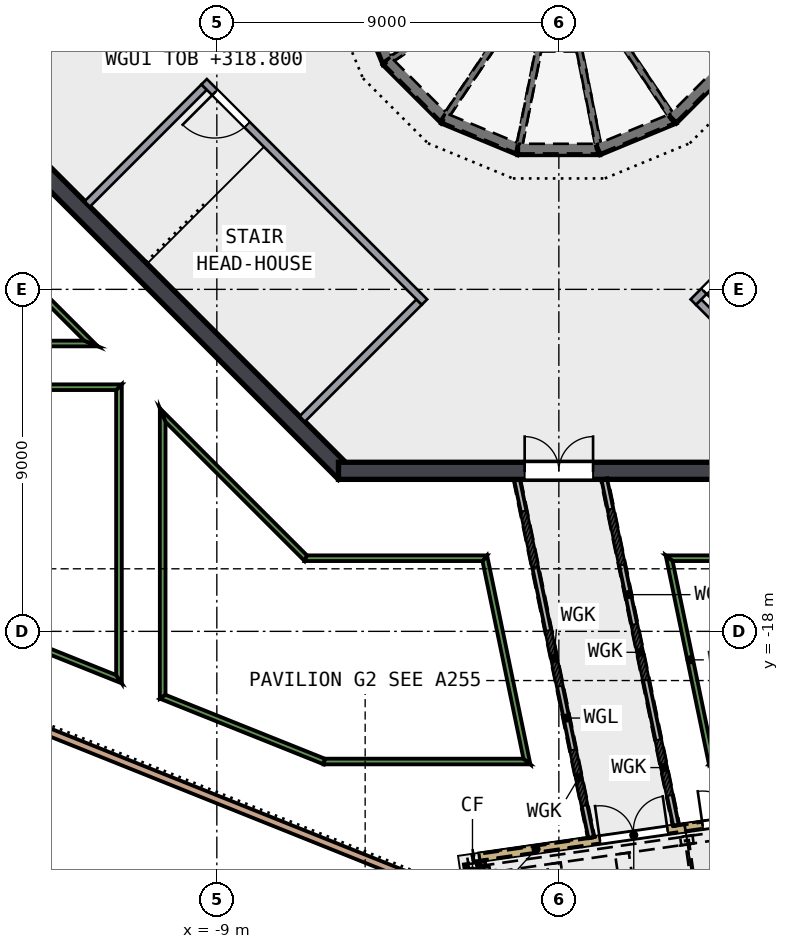
"""IFC4 building model, lengths in metres.
Left out: names, types, materials, properties, quantities, classifications, styles, units other than length and angle.
Written with IfcOpenShell. Run it as: python <this file> out.ifc"""

import sys

from ifc_helpers import new_model, si_unit, direction, frame, frame_2d, origin, origin_2d, place, context, subcontext, project, spatial, polyline, rectangle, i_section, outline, extrude, element, fill, save


model = new_model("IFC4")
c1 = context("Model", 3, precision=1e-05, world=origin(), true_north=direction((0.0, 1.0)))
c2 = subcontext(c1, "Body", "Model", "MODEL_VIEW")
j1 = project(units=[si_unit("LENGTHUNIT", "METRE"), si_unit("PLANEANGLEUNIT", "RADIAN")], contexts=[c1])
p1 = place(None, origin())
s1 = spatial("IfcSite", under=j1, at=p1, CompositionType="ELEMENT")
p2 = place(p1, origin())
s2 = spatial("IfcBuilding", under=s1, at=p2, CompositionType="ELEMENT")
p3 = place(p2, frame((0.0, 0.0, 315.0)))
s3 = spatial("IfcBuildingStorey", under=s2, at=p3, CompositionType="ELEMENT", Elevation=315.0)
p4 = place(p3, frame((-13.841, -5.64, 0.0), z_axis=(0.0, 0.0, 1.0), x_axis=(0.707106781, -0.707106781, 0.0)))
e1 = element("IfcWall", 1, at=p4, inside=s3, PredefinedType="SHEAR", context=c2, shape_type="SweptSolid", body=[
    extrude(rectangle(XDim=11.598, YDim=0.45, at=frame_2d((5.799, 0.0))), origin(), (0.0, 0.0, 1.0), 7.5),
])
p5 = place(p3, frame((-5.799, -13.775, 0.0), z_axis=(0.0, 0.0, 1.0), x_axis=(1.0, 0.0, 0.0)))
e2 = element("IfcWall", 2, at=p5, inside=s3, PredefinedType="SHEAR", context=c2, shape_type="SweptSolid", body=[
    extrude(rectangle(XDim=11.598, YDim=0.45, at=frame_2d((5.799, 0.0))), origin(), (0.0, 0.0, 1.0), 7.5),
])
p6 = place(p5, frame((4.899, 0.0, 0.0)))
e3 = element("IfcOpeningElement", 3, at=p6, cuts=e2, PredefinedType="OPENING", context=c2, shape_type="SweptSolid", body=[
    extrude(rectangle(XDim=1.8, YDim=2.1, at=frame_2d((0.9, 1.05))), frame((0.0, 0.235, 0.0), z_axis=(0.0, -1.0, 0.0), x_axis=(1.0, 0.0, 0.0)), (0.0, 0.0, 1.0), 0.47),
])
p7 = place(p3, frame((-2.273, -24.308, 0.0), z_axis=(0.0, 0.0, 1.0), x_axis=(0.141937905, -0.989875563, 0.0)))
e4 = element("IfcColumn", 4, at=p7, inside=s3, PredefinedType="COLUMN", context=c2, shape_type="SweptSolid", body=[
    extrude(i_section(OverallWidth=0.368, OverallDepth=0.356, WebThickness=0.011, FlangeThickness=0.018, FilletRadius=0.015, at=origin_2d()), origin(), (0.0, 0.0, 1.0), 4.5),
])
p8 = place(p3, frame((-2.083, -23.943, 0.0), z_axis=(0.0, 0.0, 1.0), x_axis=(0.989877825, 0.141922135, 0.0)))
e5 = element("IfcWall", 5, at=p8, inside=s3, PredefinedType="SOLIDWALL", context=c2, shape_type="SweptSolid", body=[
    extrude(rectangle(XDim=2.73, YDim=0.2, at=frame_2d((1.365, 0.0))), origin(), (0.0, 0.0, 1.0), 2.456),
])
p9 = place(p3, frame((-2.083, -23.943, 2.71), z_axis=(0.0, 0.0, 1.0), x_axis=(0.989877825, 0.141922135, 0.0)))
e6 = element("IfcWall", 6, at=p9, inside=s3, PredefinedType="SOLIDWALL", context=c2, shape_type="SweptSolid", body=[
    extrude(rectangle(XDim=2.73, YDim=0.2, at=frame_2d((1.365, 0.0))), origin(), (0.0, 0.0, 1.0), 1.09),
])
p10 = place(p3, frame((0.62, -23.556, 0.0), z_axis=(0.0, 0.0, 1.0), x_axis=(0.989877825, 0.141922135, 0.0)))
e7 = element("IfcWall", 7, at=p10, inside=s3, PredefinedType="SOLIDWALL", context=c2, shape_type="SweptSolid", body=[
    extrude(rectangle(XDim=2.73, YDim=0.2, at=frame_2d((1.365, 0.0))), origin(), (0.0, 0.0, 1.0), 2.456),
])
p11 = place(p10, frame((0.465, 0.0, 0.0)))
e8 = element("IfcOpeningElement", 8, at=p11, cuts=e7, PredefinedType="OPENING", context=c2, shape_type="SweptSolid", body=[
    extrude(rectangle(XDim=1.8, YDim=2.1, at=frame_2d((0.9, 1.05))), frame((0.0, 0.11, 0.0), z_axis=(0.0, -1.0, 0.0), x_axis=(1.0, 0.0, 0.0)), (0.0, 0.0, 1.0), 0.22),
])
p12 = place(p3, frame((0.62, -23.556, 2.71), z_axis=(0.0, 0.0, 1.0), x_axis=(0.989877825, 0.141922135, 0.0)))
e9 = element("IfcWall", 9, at=p12, inside=s3, PredefinedType="SOLIDWALL", context=c2, shape_type="SweptSolid", body=[
    extrude(rectangle(XDim=2.73, YDim=0.2, at=frame_2d((1.365, 0.0))), origin(), (0.0, 0.0, 1.0), 1.09),
])
p13 = place(p3, frame((3.322, -23.168, 0.0), z_axis=(0.0, 0.0, 1.0), x_axis=(0.989865258, 0.14200976, 0.0)))
e10 = element("IfcWall", 10, at=p13, inside=s3, PredefinedType="SOLIDWALL", context=c2, shape_type="SweptSolid", body=[
    extrude(rectangle(XDim=2.73, YDim=0.2, at=frame_2d((1.365, 0.0))), origin(), (0.0, 0.0, 1.0), 2.456),
])
p14 = place(p13, frame((0.465, 0.0, 0.0)))
e11 = element("IfcOpeningElement", 11, at=p14, cuts=e10, PredefinedType="OPENING", context=c2, shape_type="SweptSolid", body=[
    extrude(rectangle(XDim=1.8, YDim=2.1, at=frame_2d((0.9, 1.05))), frame((0.0, 0.11, 0.0), z_axis=(0.0, -1.0, 0.0), x_axis=(1.0, 0.0, 0.0)), (0.0, 0.0, 1.0), 0.22),
])
p15 = place(p3, frame((3.322, -23.168, 2.71), z_axis=(0.0, 0.0, 1.0), x_axis=(0.989865258, 0.14200976, 0.0)))
e12 = element("IfcWall", 12, at=p15, inside=s3, PredefinedType="SOLIDWALL", context=c2, shape_type="SweptSolid", body=[
    extrude(rectangle(XDim=2.73, YDim=0.2, at=frame_2d((1.365, 0.0))), origin(), (0.0, 0.0, 1.0), 1.09),
])
p16 = place(p3, frame((-2.083, -23.943, 3.8), z_axis=(0.0, 0.0, 1.0), x_axis=(0.989877825, 0.141922135, 0.0)))
e13 = element("IfcWall", 13, at=p16, inside=s3, PredefinedType="SOLIDWALL", context=c2, shape_type="SweptSolid", body=[
    extrude(outline(polyline([(0.0, 0.0), (5.46, 0.0), (5.46, 8.718), (0.0, 1.327), (0.0, 0.0)])), frame((0.0, 0.1, 0.0), z_axis=(0.0, -1.0, 0.0), x_axis=(1.0, 0.0, 0.0)), (0.0, 0.0, 1.0), 0.2),
])
p17 = place(p3, frame((8.727, -22.393, 3.8), z_axis=(0.0, 0.0, 1.0), x_axis=(-0.989871542, -0.141965948, 0.0)))
e14 = element("IfcWall", 14, at=p17, inside=s3, PredefinedType="SOLIDWALL", context=c2, shape_type="SweptSolid", body=[
    extrude(outline(polyline([(0.0, 0.0), (5.46, 0.0), (5.46, 8.718), (0.0, 1.327), (0.0, 0.0)])), frame((0.0, 0.1, 0.0), z_axis=(0.0, -1.0, 0.0), x_axis=(1.0, 0.0, 0.0)), (0.0, 0.0, 1.0), 0.2),
])
p18 = place(p3, frame((-2.009, -24.034, 0.0), z_axis=(0.0, 0.0, 1.0), x_axis=(0.141922064, -0.989877835, 0.0)))
e15 = element("IfcWall", 15, at=p18, inside=s3, PredefinedType="SOLIDWALL", context=c2, shape_type="SweptSolid", body=[
    extrude(outline(polyline([(0.0, 0.0), (9.83, 0.0), (9.836, 5.127), (9.835, 4.229), (9.83, 5.127), (9.556, 4.229), (9.555, 5.127), (0.375, 5.127), (0.374, 4.229), (0.095, 4.229), (0.094, 5.127), (0.0, 5.127), (0.0, 0.0)])), frame((0.0, 0.06, 0.0), z_axis=(0.0, -1.0, 0.0), x_axis=(1.0, 0.0, 0.0)), (0.0, 0.0, 1.0), 0.12),
])
p19 = place(p18, frame((0.861, 0.0, 0.9)))
e16 = element("IfcOpeningElement", 16, at=p19, cuts=e15, PredefinedType="OPENING", context=c2, shape_type="SweptSolid", body=[
    extrude(rectangle(XDim=1.9, YDim=2.2, at=frame_2d((0.95, 1.1))), frame((0.0, 0.07, 0.0), z_axis=(0.0, -1.0, 0.0), x_axis=(1.0, 0.0, 0.0)), (0.0, 0.0, 1.0), 0.14),
])
p20 = place(p18, frame((4.014, 0.0, 0.9)))
e17 = element("IfcOpeningElement", 17, at=p20, cuts=e15, PredefinedType="OPENING", context=c2, shape_type="SweptSolid", body=[
    extrude(rectangle(XDim=1.9, YDim=2.2, at=frame_2d((0.95, 1.1))), frame((0.0, 0.07, 0.0), z_axis=(0.0, -1.0, 0.0), x_axis=(1.0, 0.0, 0.0)), (0.0, 0.0, 1.0), 0.14),
])
p21 = place(p18, frame((7.168, 0.0, 0.9)))
e18 = element("IfcOpeningElement", 18, at=p21, cuts=e15, PredefinedType="OPENING", context=c2, shape_type="SweptSolid", body=[
    extrude(rectangle(XDim=1.9, YDim=2.2, at=frame_2d((0.95, 1.1))), frame((0.0, 0.07, 0.0), z_axis=(0.0, -1.0, 0.0), x_axis=(1.0, 0.0, 0.0)), (0.0, 0.0, 1.0), 0.14),
])
p22 = place(p3, origin())
e19 = element("IfcWall", 19, at=p22, inside=s3, PredefinedType="SOLIDWALL", context=c2, shape_type="SweptSolid", body=[
    extrude(outline(polyline([(-5.471, -1.088), (-4.638, -3.099), (-4.342, -2.901), (-5.121, -1.019), (-5.471, -1.088)])), origin(), (0.0, 0.0, 1.0), 1.12),
])
p23 = place(p3, origin())
e20 = element("IfcWall", 20, at=p23, inside=s3, PredefinedType="SOLIDWALL", context=c2, shape_type="SweptSolid", body=[
    extrude(outline(polyline([(-4.638, -3.099), (-3.099, -4.638), (-2.901, -4.342), (-4.342, -2.901), (-4.638, -3.099)])), origin(), (0.0, 0.0, 1.0), 1.12),
])
p24 = place(p3, origin())
e21 = element("IfcWall", 21, at=p24, inside=s3, PredefinedType="SOLIDWALL", context=c2, shape_type="SweptSolid", body=[
    extrude(outline(polyline([(-3.099, -4.638), (-1.088, -5.471), (-1.019, -5.121), (-2.901, -4.342), (-3.099, -4.638)])), origin(), (0.0, 0.0, 1.0), 1.12),
])
p25 = place(p3, origin())
e22 = element("IfcWall", 22, at=p25, inside=s3, PredefinedType="SOLIDWALL", context=c2, shape_type="SweptSolid", body=[
    extrude(outline(polyline([(-1.088, -5.471), (1.088, -5.471), (1.019, -5.121), (-1.019, -5.121), (-1.088, -5.471)])), origin(), (0.0, 0.0, 1.0), 1.12),
])
p26 = place(p3, origin())
e23 = element("IfcWall", 23, at=p26, inside=s3, PredefinedType="SOLIDWALL", context=c2, shape_type="SweptSolid", body=[
    extrude(outline(polyline([(1.088, -5.471), (3.099, -4.638), (2.901, -4.342), (1.019, -5.121), (1.088, -5.471)])), origin(), (0.0, 0.0, 1.0), 1.12),
])
p27 = place(p3, origin())
e24 = element("IfcWall", 24, at=p27, inside=s3, PredefinedType="SOLIDWALL", context=c2, shape_type="SweptSolid", body=[
    extrude(outline(polyline([(3.099, -4.638), (4.638, -3.099), (4.342, -2.901), (2.901, -4.342), (3.099, -4.638)])), origin(), (0.0, 0.0, 1.0), 1.12),
])
p28 = place(p3, frame((-14.996, -20.016, 0.0), z_axis=(0.0, 0.0, 1.0), x_axis=(0.928228401, -0.372010801, 0.0)))
e25 = element("IfcWall", 25, at=p28, inside=s3, PredefinedType="SOLIDWALL", context=c2, shape_type="SweptSolid", body=[
    extrude(rectangle(XDim=13.031, YDim=0.2, at=frame_2d((6.516, 0.0))), origin(), (0.0, 0.0, 1.0), 0.45),
])
p29 = place(p3, origin())
e26 = element("IfcWall", 26, at=p29, inside=s3, PredefinedType="SOLIDWALL", context=c2, shape_type="SweptSolid", body=[
    extrude(outline(polyline([(6.627, -16.0), (2.81, -16.0), (2.994, -16.15), (6.689, -16.15), (6.627, -16.0)])), origin(), (0.0, 0.0, 1.0), 0.6),
])
p30 = place(p3, origin())
e27 = element("IfcWall", 27, at=p30, inside=s3, PredefinedType="SOLIDWALL", context=c2, shape_type="SweptSolid", body=[
    extrude(outline(polyline([(2.81, -16.0), (3.949, -21.5), (4.071, -21.35), (2.994, -16.15), (2.81, -16.0)])), origin(), (0.0, 0.0, 1.0), 0.6),
])
p31 = place(p3, origin())
e28 = element("IfcWall", 28, at=p31, inside=s3, PredefinedType="SOLIDWALL", context=c2, shape_type="SweptSolid", body=[
    extrude(outline(polyline([(-20.057, -10.5), (-12.127, -10.5), (-12.49, -10.35), (-19.984, -10.35), (-20.057, -10.5)])), origin(), (0.0, 0.0, 1.0), 0.6),
])
p32 = place(p3, origin())
e29 = element("IfcWall", 29, at=p32, inside=s3, PredefinedType="SOLIDWALL", context=c2, shape_type="SweptSolid", body=[
    extrude(outline(polyline([(-12.127, -10.5), (-16.0, -6.627), (-16.15, -6.689), (-12.49, -10.35), (-12.127, -10.5)])), origin(), (0.0, 0.0, 1.0), 0.6),
])
p33 = place(p3, origin())
e30 = element("IfcWall", 30, at=p33, inside=s3, PredefinedType="SOLIDWALL", context=c2, shape_type="SweptSolid", body=[
    extrude(outline(polyline([(-6.627, -16.0), (-10.5, -12.127), (-10.35, -12.49), (-6.689, -16.15), (-6.627, -16.0)])), origin(), (0.0, 0.0, 1.0), 0.6),
])
p34 = place(p3, origin())
e31 = element("IfcWall", 31, at=p34, inside=s3, PredefinedType="SOLIDWALL", context=c2, shape_type="SweptSolid", body=[
    extrude(outline(polyline([(-10.5, -12.127), (-10.5, -19.771), (-10.35, -19.67), (-10.35, -12.49), (-10.5, -12.127)])), origin(), (0.0, 0.0, 1.0), 0.6),
])
p35 = place(p3, origin())
e32 = element("IfcWall", 32, at=p35, inside=s3, PredefinedType="SOLIDWALL", context=c2, shape_type="SweptSolid", body=[
    extrude(outline(polyline([(-10.5, -19.771), (-6.187, -21.5), (-6.157, -21.35), (-10.35, -19.67), (-10.5, -19.771)])), origin(), (0.0, 0.0, 1.0), 0.6),
])
p36 = place(p3, origin())
e33 = element("IfcWall", 33, at=p36, inside=s3, PredefinedType="SOLIDWALL", context=c2, shape_type="SweptSolid", body=[
    extrude(outline(polyline([(-6.187, -21.5), (-0.748, -21.5), (-0.933, -21.35), (-6.157, -21.35), (-6.187, -21.5)])), origin(), (0.0, 0.0, 1.0), 0.6),
])
p37 = place(p3, origin())
e34 = element("IfcWall", 34, at=p37, inside=s3, PredefinedType="SOLIDWALL", context=c2, shape_type="SweptSolid", body=[
    extrude(outline(polyline([(-0.748, -21.5), (-1.888, -16.0), (-2.01, -16.15), (-0.933, -21.35), (-0.748, -21.5)])), origin(), (0.0, 0.0, 1.0), 0.6),
])
p38 = place(p3, origin())
e35 = element("IfcWall", 35, at=p38, inside=s3, PredefinedType="SOLIDWALL", context=c2, shape_type="SweptSolid", body=[
    extrude(outline(polyline([(-1.888, -16.0), (-6.627, -16.0), (-6.689, -16.15), (-2.01, -16.15), (-1.888, -16.0)])), origin(), (0.0, 0.0, 1.0), 0.6),
])
p39 = place(p3, origin())
e36 = element("IfcWall", 36, at=p39, inside=s3, PredefinedType="SOLIDWALL", context=c2, shape_type="SweptSolid", body=[
    extrude(outline(polyline([(-13.816, -18.442), (-11.5, -19.37), (-11.65, -19.149), (-13.723, -18.318), (-13.816, -18.442)])), origin(), (0.0, 0.0, 1.0), 0.6),
])
p40 = place(p3, origin())
e37 = element("IfcWall", 37, at=p40, inside=s3, PredefinedType="SOLIDWALL", context=c2, shape_type="SweptSolid", body=[
    extrude(outline(polyline([(-11.5, -19.37), (-11.5, -11.5), (-11.65, -11.65), (-11.65, -19.149), (-11.5, -19.37)])), origin(), (0.0, 0.0, 1.0), 0.6),
])
p41 = place(p3, origin())
e38 = element("IfcWall", 38, at=p41, inside=s3, PredefinedType="SOLIDWALL", context=c2, shape_type="SweptSolid", body=[
    extrude(outline(polyline([(-11.5, -11.5), (-19.271, -11.5), (-18.963, -11.65), (-11.65, -11.65), (-11.5, -11.5)])), origin(), (0.0, 0.0, 1.0), 0.6),
])
p42 = place(p3, frame((1.196, -14.0, 0.0), z_axis=(0.0, 0.0, 1.0), x_axis=(0.202880058, -0.979203596, 0.0)))
e39 = element("IfcWall", 39, at=p42, inside=s3, PredefinedType="SOLIDWALL", context=c2, shape_type="SweptSolid", body=[
    extrude(rectangle(XDim=9.295, YDim=0.15, at=frame_2d((4.647, 0.0))), origin(), (0.0, 0.0, 1.0), 2.46),
])
p43 = place(p42, frame((0.799, 0.0, 0.9)))
e40 = element("IfcOpeningElement", 40, at=p43, cuts=e39, PredefinedType="OPENING", context=c2, shape_type="SweptSolid", body=[
    extrude(rectangle(XDim=1.5, YDim=1.3, at=frame_2d((0.75, 0.65))), frame((0.0, 0.085, 0.0), z_axis=(0.0, -1.0, 0.0), x_axis=(1.0, 0.0, 0.0)), (0.0, 0.0, 1.0), 0.17),
])
p44 = place(p42, frame((3.897, 0.0, 0.9)))
e41 = element("IfcOpeningElement", 41, at=p44, cuts=e39, PredefinedType="OPENING", context=c2, shape_type="SweptSolid", body=[
    extrude(rectangle(XDim=1.5, YDim=1.3, at=frame_2d((0.75, 0.65))), frame((0.0, 0.085, 0.0), z_axis=(0.0, -1.0, 0.0), x_axis=(1.0, 0.0, 0.0)), (0.0, 0.0, 1.0), 0.17),
])
p45 = place(p42, frame((6.996, 0.0, 0.9)))
e42 = element("IfcOpeningElement", 42, at=p45, cuts=e39, PredefinedType="OPENING", context=c2, shape_type="SweptSolid", body=[
    extrude(rectangle(XDim=1.5, YDim=1.3, at=frame_2d((0.75, 0.65))), frame((0.0, 0.085, 0.0), z_axis=(0.0, -1.0, 0.0), x_axis=(1.0, 0.0, 0.0)), (0.0, 0.0, 1.0), 0.17),
])
p46 = place(p3, frame((-1.102, -14.0, 0.0), z_axis=(0.0, 0.0, 1.0), x_axis=(0.202864863, -0.979206744, 0.0)))
e43 = element("IfcWall", 43, at=p46, inside=s3, PredefinedType="SOLIDWALL", context=c2, shape_type="SweptSolid", body=[
    extrude(rectangle(XDim=9.622, YDim=0.15, at=frame_2d((4.811, 0.0))), origin(), (0.0, 0.0, 1.0), 2.46),
])
p47 = place(p46, frame((0.854, 0.0, 0.9)))
e44 = element("IfcOpeningElement", 44, at=p47, cuts=e43, PredefinedType="OPENING", context=c2, shape_type="SweptSolid", body=[
    extrude(rectangle(XDim=1.5, YDim=1.3, at=frame_2d((0.75, 0.65))), frame((0.0, 0.085, 0.0), z_axis=(0.0, -1.0, 0.0), x_axis=(1.0, 0.0, 0.0)), (0.0, 0.0, 1.0), 0.17),
])
p48 = place(p46, frame((4.061, 0.0, 0.9)))
e45 = element("IfcOpeningElement", 45, at=p48, cuts=e43, PredefinedType="OPENING", context=c2, shape_type="SweptSolid", body=[
    extrude(rectangle(XDim=1.5, YDim=1.3, at=frame_2d((0.75, 0.65))), frame((0.0, 0.085, 0.0), z_axis=(0.0, -1.0, 0.0), x_axis=(1.0, 0.0, 0.0)), (0.0, 0.0, 1.0), 0.17),
])
p49 = place(p46, frame((7.268, 0.0, 0.9)))
e46 = element("IfcOpeningElement", 46, at=p49, cuts=e43, PredefinedType="OPENING", context=c2, shape_type="SweptSolid", body=[
    extrude(rectangle(XDim=1.5, YDim=1.3, at=frame_2d((0.75, 0.65))), frame((0.0, 0.085, 0.0), z_axis=(0.0, -1.0, 0.0), x_axis=(1.0, 0.0, 0.0)), (0.0, 0.0, 1.0), 0.17),
])
p50 = place(p3, frame((-3.535, -9.334, 0.0), z_axis=(0.0, 0.0, 1.0), x_axis=(-0.707106781, 0.707106781, 0.0)))
e47 = element("IfcWall", 47, at=p50, inside=s3, PredefinedType="SOLIDWALL", context=c2, shape_type="SweptSolid", body=[
    extrude(rectangle(XDim=8.2, YDim=0.2, at=frame_2d((4.1, 0.0))), origin(), (0.0, 0.0, 1.0), 3.6),
])
p51 = place(p50, frame((6.6, 0.0, 0.0)))
e48 = element("IfcOpeningElement", 48, at=p51, cuts=e47, PredefinedType="OPENING", context=c2, shape_type="SweptSolid", body=[
    extrude(rectangle(XDim=1.2, YDim=2.1, at=frame_2d((0.6, 1.05))), frame((0.0, 0.11, 0.0), z_axis=(0.0, -1.0, 0.0), x_axis=(1.0, 0.0, 0.0)), (0.0, 0.0, 1.0), 0.22),
])
for number, where, z_axis, x_axis in (
    (49, (-9.334, -3.677, 0.0), (0.0, 0.0, 1.0), (-0.707, -0.707, 0.0)),
    (50, (-3.677, -9.334, 0.0), (0.0, 0.0, 1.0), (-0.707, -0.707, 0.0)),
):
    element("IfcWall", number, at=place(p3, frame(where, z_axis=z_axis, x_axis=x_axis)), inside=s3, PredefinedType="SOLIDWALL", context=c2, shape_type="SweptSolid", body=[
        extrude(rectangle(XDim=4.35, YDim=0.2, at=frame_2d((2.175, 0.0))), origin(), (0.0, 0.0, 1.0), 3.6),
    ])
p52 = place(p3, frame((9.334, -3.535, 0.0), z_axis=(0.0, 0.0, 1.0), x_axis=(-0.707106781, -0.707106781, 0.0)))
e51 = element("IfcWall", 51, at=p52, inside=s3, PredefinedType="SOLIDWALL", context=c2, shape_type="SweptSolid", body=[
    extrude(rectangle(XDim=8.2, YDim=0.2, at=frame_2d((4.1, 0.0))), origin(), (0.0, 0.0, 1.0), 3.6),
])
p53 = place(p52, frame((6.6, 0.0, 0.0)))
e52 = element("IfcOpeningElement", 52, at=p53, cuts=e51, PredefinedType="OPENING", context=c2, shape_type="SweptSolid", body=[
    extrude(rectangle(XDim=1.2, YDim=2.1, at=frame_2d((0.6, 1.05))), frame((0.0, 0.11, 0.0), z_axis=(0.0, -1.0, 0.0), x_axis=(1.0, 0.0, 0.0)), (0.0, 0.0, 1.0), 0.22),
])
p54 = place(p3, frame((3.677, -9.334, 0.0), z_axis=(0.0, 0.0, 1.0), x_axis=(0.707106781, -0.707106781, 0.0)))
e53 = element("IfcWall", 53, at=p54, inside=s3, PredefinedType="SOLIDWALL", context=c2, shape_type="SweptSolid", body=[
    extrude(rectangle(XDim=4.35, YDim=0.2, at=frame_2d((2.175, 0.0))), origin(), (0.0, 0.0, 1.0), 3.6),
])
p55 = place(p11, origin())
e54 = element("IfcDoor", 54, at=p55, inside=s3, OperationType="DOUBLE_DOOR_SINGLE_SWING", PredefinedType="DOOR", context=c2, shape_type="SweptSolid", body=[
    extrude(rectangle(XDim=1.8, YDim=2.1, at=frame_2d((0.9, 1.05))), frame((0.0, 0.025, 0.0), z_axis=(0.0, -1.0, 0.0), x_axis=(1.0, 0.0, 0.0)), (0.0, 0.0, 1.0), 0.05),
])
fill(e8, e54)
p56 = place(p14, origin())
e55 = element("IfcDoor", 55, at=p56, inside=s3, OperationType="DOUBLE_DOOR_SINGLE_SWING", PredefinedType="DOOR", context=c2, shape_type="SweptSolid", body=[
    extrude(rectangle(XDim=1.8, YDim=2.1, at=frame_2d((0.9, 1.05))), frame((0.0, 0.025, 0.0), z_axis=(0.0, -1.0, 0.0), x_axis=(1.0, 0.0, 0.0)), (0.0, 0.0, 1.0), 0.05),
])
fill(e11, e55)
p57 = place(p43, origin())
e56 = element("IfcWindow", 56, at=p57, inside=s3, PartitioningType="SINGLE_PANEL", PredefinedType="WINDOW", context=c2, shape_type="SweptSolid", body=[
    extrude(rectangle(XDim=1.5, YDim=1.3, at=frame_2d((0.75, 0.65))), frame((0.0, 0.03, 0.0), z_axis=(0.0, -1.0, 0.0), x_axis=(1.0, 0.0, 0.0)), (0.0, 0.0, 1.0), 0.06),
])
fill(e40, e56)
p58 = place(p44, origin())
e57 = element("IfcWindow", 57, at=p58, inside=s3, PartitioningType="SINGLE_PANEL", PredefinedType="WINDOW", context=c2, shape_type="SweptSolid", body=[
    extrude(rectangle(XDim=1.5, YDim=1.3, at=frame_2d((0.75, 0.65))), frame((0.0, 0.03, 0.0), z_axis=(0.0, -1.0, 0.0), x_axis=(1.0, 0.0, 0.0)), (0.0, 0.0, 1.0), 0.06),
])
fill(e41, e57)
p59 = place(p45, origin())
e58 = element("IfcWindow", 58, at=p59, inside=s3, PartitioningType="SINGLE_PANEL", PredefinedType="WINDOW", context=c2, shape_type="SweptSolid", body=[
    extrude(rectangle(XDim=1.5, YDim=1.3, at=frame_2d((0.75, 0.65))), frame((0.0, 0.03, 0.0), z_axis=(0.0, -1.0, 0.0), x_axis=(1.0, 0.0, 0.0)), (0.0, 0.0, 1.0), 0.06),
])
fill(e42, e58)
p60 = place(p47, origin())
e59 = element("IfcWindow", 59, at=p60, inside=s3, PartitioningType="SINGLE_PANEL", PredefinedType="WINDOW", context=c2, shape_type="SweptSolid", body=[
    extrude(rectangle(XDim=1.5, YDim=1.3, at=frame_2d((0.75, 0.65))), frame((0.0, 0.03, 0.0), z_axis=(0.0, -1.0, 0.0), x_axis=(1.0, 0.0, 0.0)), (0.0, 0.0, 1.0), 0.06),
])
fill(e44, e59)
p61 = place(p48, origin())
e60 = element("IfcWindow", 60, at=p61, inside=s3, PartitioningType="SINGLE_PANEL", PredefinedType="WINDOW", context=c2, shape_type="SweptSolid", body=[
    extrude(rectangle(XDim=1.5, YDim=1.3, at=frame_2d((0.75, 0.65))), frame((0.0, 0.03, 0.0), z_axis=(0.0, -1.0, 0.0), x_axis=(1.0, 0.0, 0.0)), (0.0, 0.0, 1.0), 0.06),
])
fill(e45, e60)
p62 = place(p49, origin())
e61 = element("IfcWindow", 61, at=p62, inside=s3, PartitioningType="SINGLE_PANEL", PredefinedType="WINDOW", context=c2, shape_type="SweptSolid", body=[
    extrude(rectangle(XDim=1.5, YDim=1.3, at=frame_2d((0.75, 0.65))), frame((0.0, 0.03, 0.0), z_axis=(0.0, -1.0, 0.0), x_axis=(1.0, 0.0, 0.0)), (0.0, 0.0, 1.0), 0.06),
])
fill(e46, e61)
p63 = place(p6, origin())
e62 = element("IfcDoor", 62, at=p63, inside=s3, OperationType="DOUBLE_DOOR_SINGLE_SWING", PredefinedType="DOOR", context=c2, shape_type="SweptSolid", body=[
    extrude(rectangle(XDim=1.8, YDim=2.1, at=frame_2d((0.9, 1.05))), frame((0.0, 0.025, 0.0), z_axis=(0.0, -1.0, 0.0), x_axis=(1.0, 0.0, 0.0)), (0.0, 0.0, 1.0), 0.05),
])
fill(e3, e62)
p64 = place(p51, origin())
e63 = element("IfcDoor", 63, at=p64, inside=s3, OperationType="SINGLE_SWING_RIGHT", PredefinedType="DOOR", context=c2, shape_type="SweptSolid", body=[
    extrude(rectangle(XDim=1.2, YDim=2.1, at=frame_2d((0.6, 1.05))), frame((0.0, 0.025, 0.0), z_axis=(0.0, -1.0, 0.0), x_axis=(1.0, 0.0, 0.0)), (0.0, 0.0, 1.0), 0.05),
])
fill(e48, e63)
p65 = place(p53, origin())
e64 = element("IfcDoor", 64, at=p65, inside=s3, OperationType="SINGLE_SWING_RIGHT", PredefinedType="DOOR", context=c2, shape_type="SweptSolid", body=[
    extrude(rectangle(XDim=1.2, YDim=2.1, at=frame_2d((0.6, 1.05))), frame((0.0, 0.025, 0.0), z_axis=(0.0, -1.0, 0.0), x_axis=(1.0, 0.0, 0.0)), (0.0, 0.0, 1.0), 0.05),
])
fill(e52, e64)
save(model, sys.argv[1])
